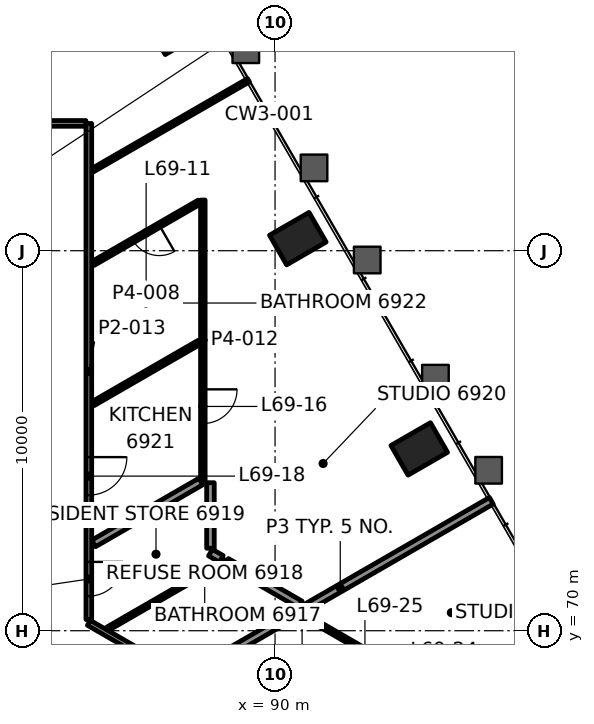
"""IFC4 building model, lengths in metres.
Left out: names, types, materials, properties, quantities, classifications, styles, units other than length and angle.
Written with IfcOpenShell. Run it as: python <this file> out.ifc"""

import sys

from ifc_helpers import new_model, si_unit, direction, frame, frame_2d, origin, origin_2d, place, context, subcontext, project, spatial, rectangle, hollow_rectangle, extrude, element, fill, save


model = new_model("IFC4")
c1 = context("Model", 3, precision=1e-05, world=origin(), true_north=direction((0.0, 1.0)))
c2 = subcontext(c1, "Body", "Model", "MODEL_VIEW")
j1 = project(units=[si_unit("LENGTHUNIT", "METRE"), si_unit("PLANEANGLEUNIT", "RADIAN")], contexts=[c1])
p1 = place(None, origin())
s1 = spatial("IfcSite", under=j1, at=p1, CompositionType="ELEMENT")
p2 = place(p1, origin())
s2 = spatial("IfcBuilding", under=s1, at=p2, CompositionType="ELEMENT")
p3 = place(p2, frame((0.0, 0.0, 288.1)))
s3 = spatial("IfcBuildingStorey", under=s2, at=p3, CompositionType="ELEMENT", Elevation=288.1)
for number, where, z_axis, x_axis in (
    (1, (96.989, 69.251, -0.0), (0.0, 0.0, 1.0), (-0.5, 0.866, 0.0)),
    (2, (93.794, 74.784, -0.0), (0.0, 0.0, 1.0), (-0.5, 0.866, 0.0)),
    (3, (90.599, 80.317, -0.0), (0.0, 0.0, 1.0), (-0.5, 0.866, 0.0)),
    (4, (87.405, 85.851, -0.0), (0.0, 0.0, 1.0), (-0.5, 0.866, 0.0)),
):
    element("IfcColumn", number, at=place(p3, frame(where, z_axis=z_axis, x_axis=x_axis)), inside=s3, PredefinedType="COLUMN", context=c2, shape_type="SweptSolid", body=[
        extrude(hollow_rectangle(XDim=0.9, YDim=1.2, WallThickness=0.06, at=origin_2d()), origin(), (0.0, 0.0, 1.0), 3.5),
    ])
p4 = place(p3, frame((78.2, 83.35, 0.0), z_axis=(0.0, 0.0, 1.0), x_axis=(1.0, 0.0, 0.0)))
e5 = element("IfcWall", 5, at=p4, inside=s3, PredefinedType="PARTITIONING", context=c2, shape_type="SweptSolid", body=[
    extrude(rectangle(XDim=6.823, YDim=0.15, at=frame_2d((3.412, 0.0))), origin(), (0.0, 0.0, 1.0), 2.7),
])
p5 = place(p4, frame((2.961, 0.0, 0.0)))
e6 = element("IfcOpeningElement", 6, at=p5, cuts=e5, PredefinedType="OPENING", context=c2, shape_type="SweptSolid", body=[
    extrude(rectangle(XDim=0.9, YDim=2.1, at=frame_2d((0.45, 1.05))), frame((0.0, 0.085, 0.0), z_axis=(0.0, -1.0, 0.0), x_axis=(1.0, 0.0, 0.0)), (0.0, 0.0, 1.0), 0.17),
])
p6 = place(p3, frame((87.741, 68.83, 0.0), z_axis=(0.0, 0.0, 1.0), x_axis=(0.866026579827, 0.499997963029, 0.0)))
e7 = element("IfcWall", 7, at=p6, inside=s3, PredefinedType="PARTITIONING", context=c2, shape_type="SweptSolid", body=[
    extrude(rectangle(XDim=9.179, YDim=0.2, at=frame_2d((4.59, 0.0))), origin(), (0.0, 0.0, 1.0), 2.688),
])
p7 = place(p3, frame((85.585, 70.045, 0.0), z_axis=(0.0, 0.0, 1.0), x_axis=(0.866004928679, 0.500035462246, 0.0)))
e8 = element("IfcWall", 8, at=p7, inside=s3, PredefinedType="PARTITIONING", context=c2, shape_type="SweptSolid", body=[
    extrude(rectangle(XDim=3.578, YDim=0.1, at=frame_2d((1.789, 0.0))), origin(), (0.0, 0.0, 1.0), 2.7),
])
p8 = place(p3, frame((85.227, 72.297, 0.0), z_axis=(0.0, 0.0, 1.0), x_axis=(0.866002113569, 0.500040337666, 0.0)))
e9 = element("IfcWall", 9, at=p8, inside=s3, PredefinedType="PARTITIONING", context=c2, shape_type="SweptSolid", body=[
    extrude(rectangle(XDim=3.258, YDim=0.2, at=frame_2d((1.629, 0.0))), origin(), (0.0, 0.0, 1.0), 2.7),
])
p9 = place(p3, frame((85.21, 75.976, 0.0), z_axis=(0.0, 0.0, 1.0), x_axis=(0.86605210011, 0.499953757757, 0.0)))
e10 = element("IfcWall", 10, at=p9, inside=s3, PredefinedType="PARTITIONING", context=c2, shape_type="SweptSolid", body=[
    extrude(rectangle(XDim=3.228, YDim=0.12, at=frame_2d((1.614, 0.0))), origin(), (0.0, 0.0, 1.0), 2.7),
])
p10 = place(p3, frame((88.005, 81.279, 0.0), z_axis=(0.0, 0.0, 1.0), x_axis=(-0.866000447062, -0.500043223821, 0.0)))
e11 = element("IfcWall", 11, at=p10, inside=s3, PredefinedType="PARTITIONING", context=c2, shape_type="SweptSolid", body=[
    extrude(rectangle(XDim=3.228, YDim=0.12, at=frame_2d((1.614, 0.0))), origin(), (0.0, 0.0, 1.0), 2.7),
])
p11 = place(p10, frame((1.214, 0.0, 0.0)))
e12 = element("IfcOpeningElement", 12, at=p11, cuts=e11, PredefinedType="OPENING", context=c2, shape_type="SweptSolid", body=[
    extrude(rectangle(XDim=0.8, YDim=2.1, at=frame_2d((0.4, 1.05))), frame((0.0, 0.07, 0.0), z_axis=(0.0, -1.0, 0.0), x_axis=(1.0, 0.0, 0.0)), (0.0, 0.0, 1.0), 0.14),
])
p12 = place(p3, frame((85.201, 82.119, 0.0), z_axis=(0.0, 0.0, 1.0), x_axis=(0.866035297817, 0.499982862641, 0.0)))
e13 = element("IfcWall", 13, at=p12, inside=s3, PredefinedType="PARTITIONING", context=c2, shape_type="SweptSolid", body=[
    extrude(rectangle(XDim=4.734, YDim=0.1, at=frame_2d((2.367, 0.0))), origin(), (0.0, 0.0, 1.0), 2.688),
])
p13 = place(p3, frame((88.3, 72.171, 0.0), z_axis=(0.0, 0.0, 1.0), x_axis=(0.0, 1.0, 0.0)))
e14 = element("IfcWall", 14, at=p13, inside=s3, PredefinedType="PARTITIONING", context=c2, shape_type="SweptSolid", body=[
    extrude(rectangle(XDim=1.724, YDim=0.2, at=frame_2d((0.862, 0.0))), origin(), (0.0, 0.0, 1.0), 2.7),
])
p14 = place(p3, frame((88.1, 81.334, 0.0), z_axis=(0.0, 0.0, 1.0), x_axis=(0.0, -1.0, 0.0)))
e15 = element("IfcWall", 15, at=p14, inside=s3, PredefinedType="PARTITIONING", context=c2, shape_type="SweptSolid", body=[
    extrude(rectangle(XDim=7.378, YDim=0.12, at=frame_2d((3.689, 0.0))), origin(), (0.0, 0.0, 1.0), 2.7),
])
p15 = place(p14, frame((4.982, 0.0, 0.0)))
e16 = element("IfcOpeningElement", 16, at=p15, cuts=e15, PredefinedType="OPENING", context=c2, shape_type="SweptSolid", body=[
    extrude(rectangle(XDim=0.9, YDim=2.1, at=frame_2d((0.45, 1.05))), frame((0.0, 0.07, 0.0), z_axis=(0.0, -1.0, 0.0), x_axis=(1.0, 0.0, 0.0)), (0.0, 0.0, 1.0), 0.14),
])
p16 = place(p3, frame((85.1, 83.348, 0.0), z_axis=(0.0, 0.0, 1.0), x_axis=(0.0, -1.0, 0.0)))
e17 = element("IfcWall", 17, at=p16, inside=s3, PredefinedType="PARTITIONING", context=c2, shape_type="SweptSolid", body=[
    extrude(rectangle(XDim=13.053, YDim=0.15, at=frame_2d((6.527, 0.0))), origin(), (0.0, 0.0, 1.0), 2.7),
])
p17 = place(p16, frame((8.78, 0.0, 0.0)))
e18 = element("IfcOpeningElement", 18, at=p17, cuts=e17, PredefinedType="OPENING", context=c2, shape_type="SweptSolid", body=[
    extrude(rectangle(XDim=1.0, YDim=2.1, at=frame_2d((0.5, 1.05))), frame((0.0, 0.085, 0.0), z_axis=(0.0, -1.0, 0.0), x_axis=(1.0, 0.0, 0.0)), (0.0, 0.0, 1.0), 0.17),
])
p18 = place(p16, frame((11.537, 0.0, 0.0)))
e19 = element("IfcOpeningElement", 19, at=p18, cuts=e17, PredefinedType="OPENING", context=c2, shape_type="SweptSolid", body=[
    extrude(rectangle(XDim=0.9, YDim=2.1, at=frame_2d((0.45, 1.05))), frame((0.0, 0.085, 0.0), z_axis=(0.0, -1.0, 0.0), x_axis=(1.0, 0.0, 0.0)), (0.0, 0.0, 1.0), 0.17),
])
p19 = place(p3, frame((90.662, 70.692, 0.0), z_axis=(0.0, 0.0, 1.0), x_axis=(-0.866034963436, 0.499983441833, 0.0)))
e20 = element("IfcWall", 20, at=p19, inside=s3, PredefinedType="PARTITIONING", context=c2, shape_type="SweptSolid", body=[
    extrude(rectangle(XDim=2.24, YDim=0.2, at=frame_2d((1.12, 0.0))), origin(), (0.0, 0.0, 1.0), 2.7),
])
p20 = place(p3, frame((97.003, 66.8, 0.0), z_axis=(0.0, 0.0, 1.0), x_axis=(-0.866012764826, 0.500021890679, 0.0)))
e21 = element("IfcWall", 21, at=p20, inside=s3, PredefinedType="PARTITIONING", context=c2, shape_type="SweptSolid", body=[
    extrude(rectangle(XDim=7.222, YDim=0.12, at=frame_2d((3.611, 0.0))), origin(), (0.0, 0.0, 1.0), 2.7),
])
p21 = place(p20, frame((1.496, 0.0, 0.0)))
e22 = element("IfcOpeningElement", 22, at=p21, cuts=e21, PredefinedType="OPENING", context=c2, shape_type="SweptSolid", body=[
    extrude(rectangle(XDim=0.9, YDim=2.1, at=frame_2d((0.45, 1.05))), frame((0.0, 0.07, 0.0), z_axis=(0.0, -1.0, 0.0), x_axis=(1.0, 0.0, 0.0)), (0.0, 0.0, 1.0), 0.14),
])
p22 = place(p20, frame((4.956, 0.0, 0.0)))
e23 = element("IfcOpeningElement", 23, at=p22, cuts=e21, PredefinedType="OPENING", context=c2, shape_type="SweptSolid", body=[
    extrude(rectangle(XDim=0.8, YDim=2.1, at=frame_2d((0.4, 1.05))), frame((0.0, 0.07, 0.0), z_axis=(0.0, -1.0, 0.0), x_axis=(1.0, 0.0, 0.0)), (0.0, 0.0, 1.0), 0.14),
])
p23 = place(p3, frame((97.014, 63.329, 0.0), z_axis=(0.0, 0.0, 1.0), x_axis=(-0.866023045711, 0.500004084281, 0.0)))
e24 = element("IfcWall", 24, at=p23, inside=s3, PredefinedType="PARTITIONING", context=c2, shape_type="SweptSolid", body=[
    extrude(rectangle(XDim=13.757, YDim=0.15, at=frame_2d((6.879, 0.0))), origin(), (0.0, 0.0, 1.0), 2.7),
])
p24 = place(p23, frame((1.39, 0.0, 0.0)))
e25 = element("IfcOpeningElement", 25, at=p24, cuts=e24, PredefinedType="OPENING", context=c2, shape_type="SweptSolid", body=[
    extrude(rectangle(XDim=0.9, YDim=2.1, at=frame_2d((0.45, 1.05))), frame((0.0, 0.085, 0.0), z_axis=(0.0, -1.0, 0.0), x_axis=(1.0, 0.0, 0.0)), (0.0, 0.0, 1.0), 0.17),
])
p25 = place(p23, frame((4.821, 0.0, 0.0)))
e26 = element("IfcOpeningElement", 26, at=p25, cuts=e24, PredefinedType="OPENING", context=c2, shape_type="SweptSolid", body=[
    extrude(rectangle(XDim=1.0, YDim=2.1, at=frame_2d((0.5, 1.05))), frame((0.0, 0.085, 0.0), z_axis=(0.0, -1.0, 0.0), x_axis=(1.0, 0.0, 0.0)), (0.0, 0.0, 1.0), 0.17),
])
p26 = place(p23, frame((11.634, 0.0, 0.0)))
e27 = element("IfcOpeningElement", 27, at=p26, cuts=e24, PredefinedType="OPENING", context=c2, shape_type="SweptSolid", body=[
    extrude(rectangle(XDim=0.9, YDim=2.1, at=frame_2d((0.45, 1.05))), frame((0.0, 0.085, 0.0), z_axis=(0.0, -1.0, 0.0), x_axis=(1.0, 0.0, 0.0)), (0.0, 0.0, 1.0), 0.17),
])
p27 = place(p3, frame((88.584, 71.892, 0.0), z_axis=(0.0, 0.0, 1.0), x_axis=(-0.865987003449, 0.500066505434, 0.0)))
e28 = element("IfcWall", 28, at=p27, inside=s3, PredefinedType="PARTITIONING", context=c2, shape_type="SweptSolid", body=[
    extrude(rectangle(XDim=0.328, YDim=0.2, at=frame_2d((0.164, 0.0))), origin(), (0.0, 0.0, 1.0), 2.7),
])
p28 = place(p11, origin())
e29 = element("IfcDoor", 29, at=p28, inside=s3, OperationType="SINGLE_SWING_RIGHT", PredefinedType="DOOR", context=c2, shape_type="SweptSolid", body=[
    extrude(rectangle(XDim=0.8, YDim=2.1, at=frame_2d((0.4, 1.05))), frame((0.0, 0.025, 0.0), z_axis=(0.0, -1.0, 0.0), x_axis=(1.0, 0.0, 0.0)), (0.0, 0.0, 1.0), 0.05),
])
fill(e12, e29)
p29 = place(p15, origin())
e30 = element("IfcDoor", 30, at=p29, inside=s3, OperationType="SINGLE_SWING_RIGHT", PredefinedType="DOOR", context=c2, shape_type="SweptSolid", body=[
    extrude(rectangle(XDim=0.9, YDim=2.1, at=frame_2d((0.45, 1.05))), frame((0.0, 0.025, 0.0), z_axis=(0.0, -1.0, 0.0), x_axis=(1.0, 0.0, 0.0)), (0.0, 0.0, 1.0), 0.05),
])
fill(e16, e30)
p30 = place(p17, origin())
e31 = element("IfcDoor", 31, at=p30, inside=s3, OperationType="SINGLE_SWING_LEFT", PredefinedType="DOOR", context=c2, shape_type="SweptSolid", body=[
    extrude(rectangle(XDim=1.0, YDim=2.1, at=frame_2d((0.5, 1.05))), frame((0.0, 0.025, 0.0), z_axis=(0.0, -1.0, 0.0), x_axis=(1.0, 0.0, 0.0)), (0.0, 0.0, 1.0), 0.05),
])
fill(e18, e31)
p31 = place(p18, origin())
e32 = element("IfcDoor", 32, at=p31, inside=s3, OperationType="SINGLE_SWING_LEFT", PredefinedType="DOOR", context=c2, shape_type="SweptSolid", body=[
    extrude(rectangle(XDim=0.9, YDim=2.1, at=frame_2d((0.45, 1.05))), frame((0.0, 0.025, 0.0), z_axis=(0.0, -1.0, 0.0), x_axis=(1.0, 0.0, 0.0)), (0.0, 0.0, 1.0), 0.05),
])
fill(e19, e32)
p32 = place(p22, origin())
e33 = element("IfcDoor", 33, at=p32, inside=s3, OperationType="SINGLE_SWING_RIGHT", PredefinedType="DOOR", context=c2, shape_type="SweptSolid", body=[
    extrude(rectangle(XDim=0.8, YDim=2.1, at=frame_2d((0.4, 1.05))), frame((0.0, 0.025, 0.0), z_axis=(0.0, -1.0, 0.0), x_axis=(1.0, 0.0, 0.0)), (0.0, 0.0, 1.0), 0.05),
])
fill(e23, e33)
save(model, sys.argv[1])
